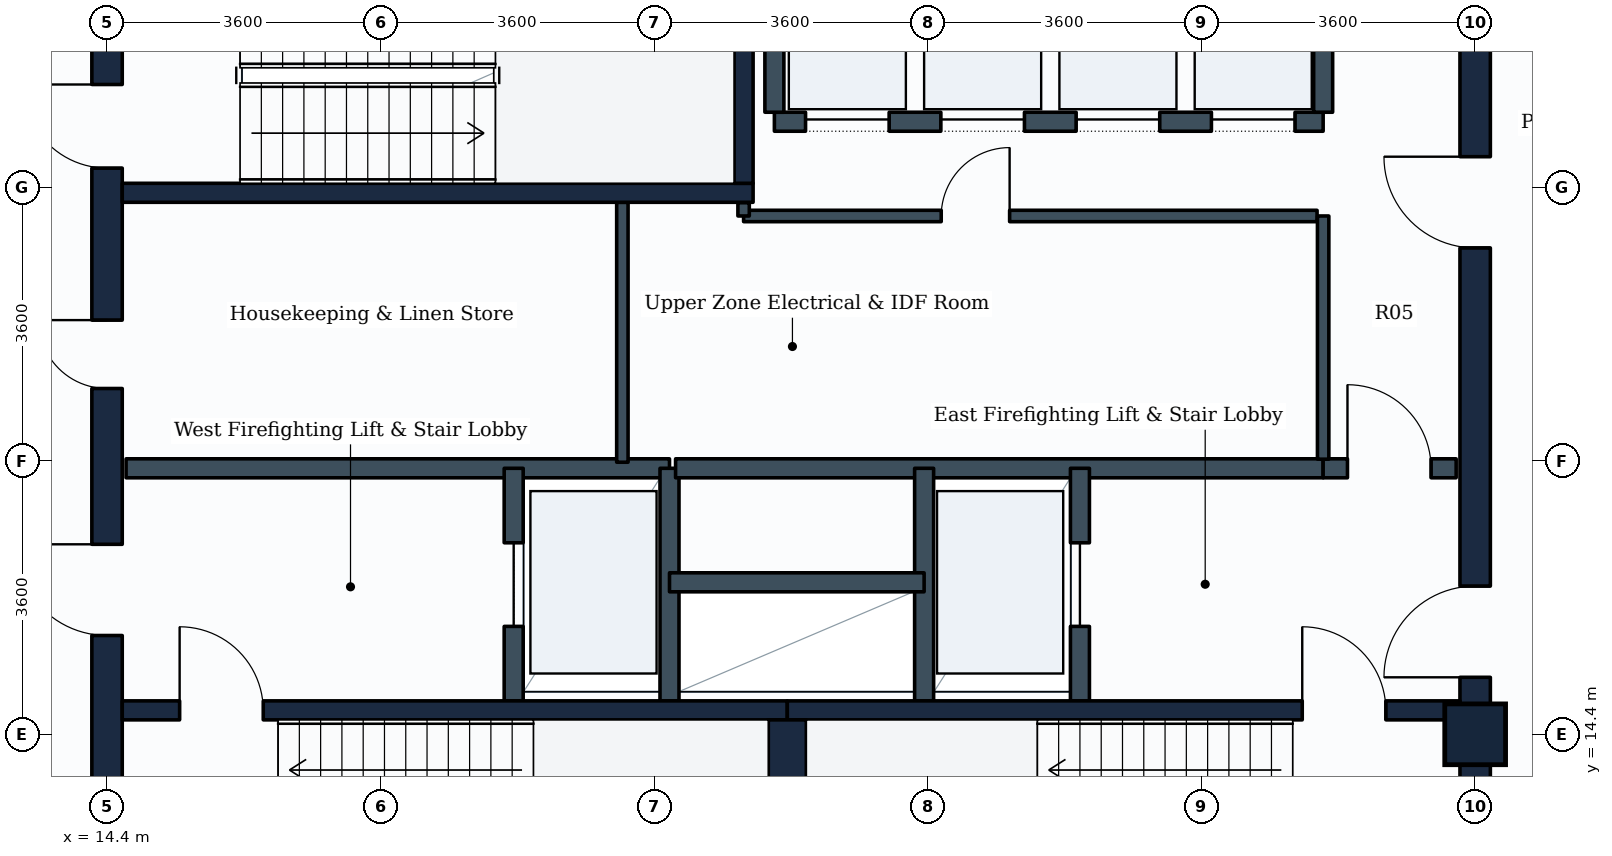
"""IFC4 building model, lengths in metres.
Left out: names, types, materials, properties, quantities, classifications, styles, units other than length and angle.
Written with IfcOpenShell. Run it as: python <this file> out.ifc"""

import sys

from ifc_helpers import new_model, si_unit, direction, frame, frame_2d, origin, origin_2d, place, context, subcontext, project, spatial, rectangle, extrude, element, fill, save


model = new_model("IFC4")
c1 = context("Model", 3, precision=1e-05, world=origin(), true_north=direction((0.0, 1.0)))
c2 = subcontext(c1, "Body", "Model", "MODEL_VIEW")
j1 = project(units=[si_unit("LENGTHUNIT", "METRE"), si_unit("PLANEANGLEUNIT", "RADIAN")], contexts=[c1])
p1 = place(None, origin())
s1 = spatial("IfcSite", under=j1, at=p1, CompositionType="ELEMENT")
p2 = place(p1, origin())
s2 = spatial("IfcBuilding", under=s1, at=p2, CompositionType="ELEMENT")
p3 = place(p2, frame((0.0, 0.0, 295.4)))
s3 = spatial("IfcBuildingStorey", under=s2, at=p3, CompositionType="ELEMENT", Elevation=295.4)
p4 = place(p3, frame((32.4, 14.4, 0.0), z_axis=(0.0, 0.0, 1.0), x_axis=(1.0, 0.0, 0.0)))
e1 = element("IfcColumn", 1, at=p4, inside=s3, PredefinedType="COLUMN", context=c2, shape_type="SweptSolid", body=[
    extrude(rectangle(XDim=0.8, YDim=0.8, at=origin_2d()), origin(), (0.0, 0.0, 1.0), 4.4),
])
p5 = place(p3, frame((14.4, 10.8, 0.0), z_axis=(0.0, 0.0, 1.0), x_axis=(0.0, 1.0, 0.0)))
e2 = element("IfcWall", 2, at=p5, inside=s3, PredefinedType="SHEAR", context=c2, shape_type="SweptSolid", body=[
    extrude(rectangle(XDim=14.4, YDim=0.4, at=frame_2d((7.2, 0.0))), origin(), (0.0, 0.0, 1.0), 4.15),
])
p6 = place(p5, frame((11.05, 0.0, 0.0)))
e3 = element("IfcOpeningElement", 3, at=p6, cuts=e2, PredefinedType="OPENING", context=c2, shape_type="SweptSolid", body=[
    extrude(rectangle(XDim=1.1, YDim=2.1, at=frame_2d((0.55, 1.05))), frame((0.0, 0.21, 0.0), z_axis=(0.0, -1.0, 0.0), x_axis=(1.0, 0.0, 0.0)), (0.0, 0.0, 1.0), 0.42),
])
p7 = place(p5, frame((4.9, 0.0, 0.0)))
e4 = element("IfcOpeningElement", 4, at=p7, cuts=e2, PredefinedType="OPENING", context=c2, shape_type="SweptSolid", body=[
    extrude(rectangle(XDim=1.2, YDim=2.1, at=frame_2d((0.6, 1.05))), frame((0.0, 0.21, 0.0), z_axis=(0.0, -1.0, 0.0), x_axis=(1.0, 0.0, 0.0)), (0.0, 0.0, 1.0), 0.42),
])
p8 = place(p5, frame((8.15, 0.0, 0.0)))
e5 = element("IfcOpeningElement", 5, at=p8, cuts=e2, PredefinedType="OPENING", context=c2, shape_type="SweptSolid", body=[
    extrude(rectangle(XDim=0.9, YDim=2.1, at=frame_2d((0.45, 1.05))), frame((0.0, 0.21, 0.0), z_axis=(0.0, -1.0, 0.0), x_axis=(1.0, 0.0, 0.0)), (0.0, 0.0, 1.0), 0.42),
])
p9 = place(p3, frame((32.4, 10.8, 0.0), z_axis=(0.0, 0.0, 1.0), x_axis=(0.0, 1.0, 0.0)))
e6 = element("IfcWall", 6, at=p9, inside=s3, PredefinedType="SHEAR", context=c2, shape_type="SweptSolid", body=[
    extrude(rectangle(XDim=14.4, YDim=0.4, at=frame_2d((7.2, 0.0))), origin(), (0.0, 0.0, 1.0), 4.15),
])
p10 = place(p9, frame((4.35, 0.0, 0.0)))
e7 = element("IfcOpeningElement", 7, at=p10, cuts=e6, PredefinedType="OPENING", context=c2, shape_type="SweptSolid", body=[
    extrude(rectangle(XDim=1.2, YDim=2.1, at=frame_2d((0.6, 1.05))), frame((0.0, 0.21, 0.0), z_axis=(0.0, -1.0, 0.0), x_axis=(1.0, 0.0, 0.0)), (0.0, 0.0, 1.0), 0.42),
])
p11 = place(p9, frame((10.0, 0.0, 0.0)))
e8 = element("IfcOpeningElement", 8, at=p11, cuts=e6, PredefinedType="OPENING", context=c2, shape_type="SweptSolid", body=[
    extrude(rectangle(XDim=1.2, YDim=2.1, at=frame_2d((0.6, 1.05))), frame((0.0, 0.21, 0.0), z_axis=(0.0, -1.0, 0.0), x_axis=(1.0, 0.0, 0.0)), (0.0, 0.0, 1.0), 0.42),
])
p12 = place(p3, frame((14.6, 14.715, 0.0), z_axis=(0.0, 0.0, 1.0), x_axis=(1.0, 0.0, 0.0)))
e9 = element("IfcWall", 9, at=p12, inside=s3, PredefinedType="SHEAR", context=c2, shape_type="SweptSolid", body=[
    extrude(rectangle(XDim=8.75, YDim=0.25, at=frame_2d((4.375, 0.0))), origin(), (0.0, 0.0, 1.0), 4.15),
])
p13 = place(p12, frame((0.755, 0.0, 0.0)))
e10 = element("IfcOpeningElement", 10, at=p13, cuts=e9, PredefinedType="OPENING", context=c2, shape_type="SweptSolid", body=[
    extrude(rectangle(XDim=1.1, YDim=2.1, at=frame_2d((0.55, 1.05))), frame((0.0, 0.135, 0.0), z_axis=(0.0, -1.0, 0.0), x_axis=(1.0, 0.0, 0.0)), (0.0, 0.0, 1.0), 0.27),
])
p14 = place(p3, frame((23.35, 14.715, 0.0), z_axis=(0.0, 0.0, 1.0), x_axis=(1.0, 0.0, 0.0)))
e11 = element("IfcWall", 11, at=p14, inside=s3, PredefinedType="SHEAR", context=c2, shape_type="SweptSolid", body=[
    extrude(rectangle(XDim=8.85, YDim=0.25, at=frame_2d((4.425, 0.0))), origin(), (0.0, 0.0, 1.0), 4.15),
])
p15 = place(p14, frame((6.775, 0.0, 0.0)))
e12 = element("IfcOpeningElement", 12, at=p15, cuts=e11, PredefinedType="OPENING", context=c2, shape_type="SweptSolid", body=[
    extrude(rectangle(XDim=1.1, YDim=2.1, at=frame_2d((0.55, 1.05))), frame((0.0, 0.135, 0.0), z_axis=(0.0, -1.0, 0.0), x_axis=(1.0, 0.0, 0.0)), (0.0, 0.0, 1.0), 0.27),
])
p16 = place(p3, frame((23.35, 11.75, 0.0), z_axis=(0.0, 0.0, 1.0), x_axis=(0.0, 1.0, 0.0)))
e13 = element("IfcWall", 13, at=p16, inside=s3, PredefinedType="SHEAR", context=c2, shape_type="SweptSolid", body=[
    extrude(rectangle(XDim=2.84, YDim=0.5, at=frame_2d((1.42, 0.0))), origin(), (0.0, 0.0, 1.0), 4.15),
])
p17 = place(p3, frame((14.6, 21.525, 0.0), z_axis=(0.0, 0.0, 1.0), x_axis=(1.0, 0.0, 0.0)))
e14 = element("IfcWall", 14, at=p17, inside=s3, PredefinedType="SHEAR", context=c2, shape_type="SweptSolid", body=[
    extrude(rectangle(XDim=8.3, YDim=0.25, at=frame_2d((4.15, 0.0))), origin(), (0.0, 0.0, 1.0), 4.15),
])
p18 = place(p3, frame((22.775, 21.65, 0.0), z_axis=(0.0, 0.0, 1.0), x_axis=(0.0, 1.0, 0.0)))
e15 = element("IfcWall", 15, at=p18, inside=s3, PredefinedType="SHEAR", context=c2, shape_type="SweptSolid", body=[
    extrude(rectangle(XDim=2.84, YDim=0.25, at=frame_2d((1.42, 0.0))), origin(), (0.0, 0.0, 1.0), 4.15),
])
p19 = place(p3, frame((14.65, 17.9, 0.0), z_axis=(0.0, 0.0, 1.0), x_axis=(1.0, 0.0, 0.0)))
e16 = element("IfcWall", 16, at=p19, inside=s3, PredefinedType="PARTITIONING", context=c2, shape_type="SweptSolid", body=[
    extrude(rectangle(XDim=7.15, YDim=0.25, at=frame_2d((3.575, 0.0))), origin(), (0.0, 0.0, 1.0), 4.135),
])
p20 = place(p3, frame((19.75, 14.84, 0.0), z_axis=(0.0, 0.0, 1.0), x_axis=(0.0, 1.0, 0.0)))
e17 = element("IfcWall", 17, at=p20, inside=s3, PredefinedType="PARTITIONING", context=c2, shape_type="SweptSolid", body=[
    extrude(rectangle(XDim=3.06, YDim=0.25, at=frame_2d((1.53, 0.0))), origin(), (0.0, 0.0, 1.0), 4.135),
])
p21 = place(p20, frame((0.98, 0.0, 0.0)))
e18 = element("IfcOpeningElement", 18, at=p21, cuts=e17, PredefinedType="OPENING", context=c2, shape_type="SweptSolid", body=[
    extrude(rectangle(XDim=1.1, YDim=2.1, at=frame_2d((0.55, 1.05))), frame((0.0, 0.135, 0.0), z_axis=(0.0, -1.0, 0.0), x_axis=(1.0, 0.0, 0.0)), (0.0, 0.0, 1.0), 0.27),
])
p22 = place(p3, frame((21.8, 14.84, 0.0), z_axis=(0.0, 0.0, 1.0), x_axis=(0.0, 1.0, 0.0)))
e19 = element("IfcWall", 19, at=p22, inside=s3, PredefinedType="PARTITIONING", context=c2, shape_type="SweptSolid", body=[
    extrude(rectangle(XDim=3.06, YDim=0.25, at=frame_2d((1.53, 0.0))), origin(), (0.0, 0.0, 1.0), 4.135),
])
p23 = place(p3, frame((21.88, 17.9, 0.0), z_axis=(0.0, 0.0, 1.0), x_axis=(1.0, 0.0, 0.0)))
e20 = element("IfcWall", 20, at=p23, inside=s3, PredefinedType="PARTITIONING", context=c2, shape_type="SweptSolid", body=[
    extrude(rectangle(XDim=8.52, YDim=0.25, at=frame_2d((4.26, 0.0))), origin(), (0.0, 0.0, 1.0), 4.135),
])
p24 = place(p3, frame((30.4, 17.9, 0.0), z_axis=(0.0, 0.0, 1.0), x_axis=(1.0, 0.0, 0.0)))
e21 = element("IfcWall", 21, at=p24, inside=s3, PredefinedType="PARTITIONING", context=c2, shape_type="SweptSolid", body=[
    extrude(rectangle(XDim=1.75, YDim=0.25, at=frame_2d((0.875, 0.0))), origin(), (0.0, 0.0, 1.0), 4.135),
])
p25 = place(p24, frame((0.32, 0.0, 0.0)))
e22 = element("IfcOpeningElement", 22, at=p25, cuts=e21, PredefinedType="OPENING", context=c2, shape_type="SweptSolid", body=[
    extrude(rectangle(XDim=1.1, YDim=2.1, at=frame_2d((0.55, 1.05))), frame((0.0, 0.135, 0.0), z_axis=(0.0, -1.0, 0.0), x_axis=(1.0, 0.0, 0.0)), (0.0, 0.0, 1.0), 0.27),
])
p26 = place(p3, frame((25.15, 14.84, 0.0), z_axis=(0.0, 0.0, 1.0), x_axis=(0.0, 1.0, 0.0)))
e23 = element("IfcWall", 23, at=p26, inside=s3, PredefinedType="PARTITIONING", context=c2, shape_type="SweptSolid", body=[
    extrude(rectangle(XDim=3.06, YDim=0.25, at=frame_2d((1.53, 0.0))), origin(), (0.0, 0.0, 1.0), 4.135),
])
p27 = place(p3, frame((27.2, 14.84, 0.0), z_axis=(0.0, 0.0, 1.0), x_axis=(0.0, 1.0, 0.0)))
e24 = element("IfcWall", 24, at=p27, inside=s3, PredefinedType="PARTITIONING", context=c2, shape_type="SweptSolid", body=[
    extrude(rectangle(XDim=3.06, YDim=0.25, at=frame_2d((1.53, 0.0))), origin(), (0.0, 0.0, 1.0), 4.135),
])
p28 = place(p27, frame((0.98, 0.0, 0.0)))
e25 = element("IfcOpeningElement", 25, at=p28, cuts=e24, PredefinedType="OPENING", context=c2, shape_type="SweptSolid", body=[
    extrude(rectangle(XDim=1.1, YDim=2.1, at=frame_2d((0.55, 1.05))), frame((0.0, 0.135, 0.0), z_axis=(0.0, -1.0, 0.0), x_axis=(1.0, 0.0, 0.0)), (0.0, 0.0, 1.0), 0.27),
])
p29 = place(p3, frame((21.8, 16.4, 0.0), z_axis=(0.0, 0.0, 1.0), x_axis=(1.0, 0.0, 0.0)))
e26 = element("IfcWall", 26, at=p29, inside=s3, PredefinedType="PARTITIONING", context=c2, shape_type="SweptSolid", body=[
    extrude(rectangle(XDim=3.35, YDim=0.25, at=frame_2d((1.675, 0.0))), origin(), (0.0, 0.0, 1.0), 4.135),
])
p30 = place(p3, frame((23.18, 22.46, 0.0), z_axis=(0.0, 0.0, 1.0), x_axis=(1.0, 0.0, 0.0)))
e27 = element("IfcWall", 27, at=p30, inside=s3, PredefinedType="PARTITIONING", context=c2, shape_type="SweptSolid", body=[
    extrude(rectangle(XDim=7.22, YDim=0.25, at=frame_2d((3.61, 0.0))), origin(), (0.0, 0.0, 1.0), 4.135),
])
p31 = place(p30, frame((0.41, 0.0, 0.0)))
e28 = element("IfcOpeningElement", 28, at=p31, cuts=e27, PredefinedType="OPENING", context=c2, shape_type="SweptSolid", body=[
    extrude(rectangle(XDim=1.1, YDim=2.1, at=frame_2d((0.55, 1.05))), frame((0.0, 0.135, 0.0), z_axis=(0.0, -1.0, 0.0), x_axis=(1.0, 0.0, 0.0)), (0.0, 0.0, 1.0), 0.27),
])
p32 = place(p30, frame((2.19, 0.0, 0.0)))
e29 = element("IfcOpeningElement", 29, at=p32, cuts=e27, PredefinedType="OPENING", context=c2, shape_type="SweptSolid", body=[
    extrude(rectangle(XDim=1.1, YDim=2.1, at=frame_2d((0.55, 1.05))), frame((0.0, 0.135, 0.0), z_axis=(0.0, -1.0, 0.0), x_axis=(1.0, 0.0, 0.0)), (0.0, 0.0, 1.0), 0.27),
])
p33 = place(p30, frame((3.97, 0.0, 0.0)))
e30 = element("IfcOpeningElement", 30, at=p33, cuts=e27, PredefinedType="OPENING", context=c2, shape_type="SweptSolid", body=[
    extrude(rectangle(XDim=1.1, YDim=2.1, at=frame_2d((0.55, 1.05))), frame((0.0, 0.135, 0.0), z_axis=(0.0, -1.0, 0.0), x_axis=(1.0, 0.0, 0.0)), (0.0, 0.0, 1.0), 0.27),
])
p34 = place(p30, frame((5.75, 0.0, 0.0)))
e31 = element("IfcOpeningElement", 31, at=p34, cuts=e27, PredefinedType="OPENING", context=c2, shape_type="SweptSolid", body=[
    extrude(rectangle(XDim=1.1, YDim=2.1, at=frame_2d((0.55, 1.05))), frame((0.0, 0.135, 0.0), z_axis=(0.0, -1.0, 0.0), x_axis=(1.0, 0.0, 0.0)), (0.0, 0.0, 1.0), 0.27),
])
for number, where, z_axis, x_axis in (
    (32, (23.18, 22.585, 0.0), (0.0, 0.0, 1.0), (0.0, 1.0, 0.0)),
    (33, (30.4, 22.585, 0.0), (0.0, 0.0, 1.0), (0.0, 1.0, 0.0)),
):
    element("IfcWall", number, at=place(p3, frame(where, z_axis=z_axis, x_axis=x_axis)), inside=s3, PredefinedType="PARTITIONING", context=c2, shape_type="SweptSolid", body=[
        extrude(rectangle(XDim=2.315, YDim=0.25, at=frame_2d((1.157, 0.0))), origin(), (0.0, 0.0, 1.0), 4.135),
    ])
p35 = place(p3, frame((22.775, 21.22, 0.0), z_axis=(0.0, 0.0, 1.0), x_axis=(1.0, 0.0, 0.0)))
e34 = element("IfcWall", 34, at=p35, inside=s3, PredefinedType="PARTITIONING", context=c2, shape_type="SweptSolid", body=[
    extrude(rectangle(XDim=7.545, YDim=0.15, at=frame_2d((3.772, 0.0))), origin(), (0.0, 0.0, 1.0), 4.135),
])
p36 = place(p35, frame((2.6, 0.0, 0.0)))
e35 = element("IfcOpeningElement", 35, at=p36, cuts=e34, PredefinedType="OPENING", context=c2, shape_type="SweptSolid", body=[
    extrude(rectangle(XDim=0.9, YDim=2.1, at=frame_2d((0.45, 1.05))), frame((0.0, 0.085, 0.0), z_axis=(0.0, -1.0, 0.0), x_axis=(1.0, 0.0, 0.0)), (0.0, 0.0, 1.0), 0.17),
])
p37 = place(p3, frame((22.775, 21.22, 0.0), z_axis=(0.0, 0.0, 1.0), x_axis=(0.0, 1.0, 0.0)))
e36 = element("IfcWall", 36, at=p37, inside=s3, PredefinedType="PARTITIONING", context=c2, shape_type="SweptSolid", body=[
    extrude(rectangle(XDim=0.175, YDim=0.15, at=frame_2d((0.087, 0.0))), origin(), (0.0, 0.0, 1.0), 4.135),
])
p38 = place(p3, frame((30.4, 18.02, 0.0), z_axis=(0.0, 0.0, 1.0), x_axis=(0.0, 1.0, 0.0)))
e37 = element("IfcWall", 37, at=p38, inside=s3, PredefinedType="PARTITIONING", context=c2, shape_type="SweptSolid", body=[
    extrude(rectangle(XDim=3.2, YDim=0.15, at=frame_2d((1.6, 0.0))), origin(), (0.0, 0.0, 1.0), 4.135),
])
p39 = place(p3, frame((21.18, 17.98, 0.0), z_axis=(0.0, 0.0, 1.0), x_axis=(0.0, 1.0, 0.0)))
e38 = element("IfcWall", 38, at=p39, inside=s3, PredefinedType="PARTITIONING", context=c2, shape_type="SweptSolid", body=[
    extrude(rectangle(XDim=3.42, YDim=0.15, at=frame_2d((1.71, 0.0))), origin(), (0.0, 0.0, 1.0), 4.135),
])
p40 = place(p13, origin())
e39 = element("IfcDoor", 39, at=p40, inside=s3, OperationType="SINGLE_SWING_LEFT", PredefinedType="DOOR", context=c2, shape_type="SweptSolid", body=[
    extrude(rectangle(XDim=1.1, YDim=2.1, at=frame_2d((0.55, 1.05))), frame((0.0, 0.025, 0.0), z_axis=(0.0, -1.0, 0.0), x_axis=(1.0, 0.0, 0.0)), (0.0, 0.0, 1.0), 0.05),
])
fill(e10, e39)
p41 = place(p15, origin())
e40 = element("IfcDoor", 40, at=p41, inside=s3, OperationType="SINGLE_SWING_LEFT", PredefinedType="DOOR", context=c2, shape_type="SweptSolid", body=[
    extrude(rectangle(XDim=1.1, YDim=2.1, at=frame_2d((0.55, 1.05))), frame((0.0, 0.025, 0.0), z_axis=(0.0, -1.0, 0.0), x_axis=(1.0, 0.0, 0.0)), (0.0, 0.0, 1.0), 0.05),
])
fill(e12, e40)
p42 = place(p6, origin())
e41 = element("IfcDoor", 41, at=p42, inside=s3, OperationType="SINGLE_SWING_RIGHT", PredefinedType="DOOR", context=c2, shape_type="SweptSolid", body=[
    extrude(rectangle(XDim=1.1, YDim=2.1, at=frame_2d((0.55, 1.05))), frame((0.0, 0.025, 0.0), z_axis=(0.0, -1.0, 0.0), x_axis=(1.0, 0.0, 0.0)), (0.0, 0.0, 1.0), 0.05),
])
fill(e3, e41)
p43 = place(p21, origin())
e42 = element("IfcDoor", 42, at=p43, inside=s3, OperationType="SLIDING_TO_LEFT", PredefinedType="DOOR", context=c2, shape_type="SweptSolid", body=[
    extrude(rectangle(XDim=1.1, YDim=2.1, at=frame_2d((0.55, 1.05))), frame((0.0, 0.025, 0.0), z_axis=(0.0, -1.0, 0.0), x_axis=(1.0, 0.0, 0.0)), (0.0, 0.0, 1.0), 0.05),
])
fill(e18, e42)
p44 = place(p28, origin())
e43 = element("IfcDoor", 43, at=p44, inside=s3, OperationType="SLIDING_TO_LEFT", PredefinedType="DOOR", context=c2, shape_type="SweptSolid", body=[
    extrude(rectangle(XDim=1.1, YDim=2.1, at=frame_2d((0.55, 1.05))), frame((0.0, 0.025, 0.0), z_axis=(0.0, -1.0, 0.0), x_axis=(1.0, 0.0, 0.0)), (0.0, 0.0, 1.0), 0.05),
])
fill(e25, e43)
p45 = place(p7, origin())
e44 = element("IfcDoor", 44, at=p45, inside=s3, OperationType="SINGLE_SWING_RIGHT", PredefinedType="DOOR", context=c2, shape_type="SweptSolid", body=[
    extrude(rectangle(XDim=1.2, YDim=2.1, at=frame_2d((0.6, 1.05))), frame((0.0, 0.025, 0.0), z_axis=(0.0, -1.0, 0.0), x_axis=(1.0, 0.0, 0.0)), (0.0, 0.0, 1.0), 0.05),
])
fill(e4, e44)
p46 = place(p10, origin())
e45 = element("IfcDoor", 45, at=p46, inside=s3, OperationType="SINGLE_SWING_LEFT", PredefinedType="DOOR", context=c2, shape_type="SweptSolid", body=[
    extrude(rectangle(XDim=1.2, YDim=2.1, at=frame_2d((0.6, 1.05))), frame((0.0, 0.025, 0.0), z_axis=(0.0, -1.0, 0.0), x_axis=(1.0, 0.0, 0.0)), (0.0, 0.0, 1.0), 0.05),
])
fill(e7, e45)
p47 = place(p25, origin())
e46 = element("IfcDoor", 46, at=p47, inside=s3, OperationType="SINGLE_SWING_LEFT", PredefinedType="DOOR", context=c2, shape_type="SweptSolid", body=[
    extrude(rectangle(XDim=1.1, YDim=2.1, at=frame_2d((0.55, 1.05))), frame((0.0, 0.025, 0.0), z_axis=(0.0, -1.0, 0.0), x_axis=(1.0, 0.0, 0.0)), (0.0, 0.0, 1.0), 0.05),
])
fill(e22, e46)
p48 = place(p31, origin())
e47 = element("IfcDoor", 47, at=p48, inside=s3, OperationType="SLIDING_TO_LEFT", PredefinedType="DOOR", context=c2, shape_type="SweptSolid", body=[
    extrude(rectangle(XDim=1.1, YDim=2.1, at=frame_2d((0.55, 1.05))), frame((0.0, 0.025, 0.0), z_axis=(0.0, -1.0, 0.0), x_axis=(1.0, 0.0, 0.0)), (0.0, 0.0, 1.0), 0.05),
])
fill(e28, e47)
p49 = place(p32, origin())
e48 = element("IfcDoor", 48, at=p49, inside=s3, OperationType="SLIDING_TO_LEFT", PredefinedType="DOOR", context=c2, shape_type="SweptSolid", body=[
    extrude(rectangle(XDim=1.1, YDim=2.1, at=frame_2d((0.55, 1.05))), frame((0.0, 0.025, 0.0), z_axis=(0.0, -1.0, 0.0), x_axis=(1.0, 0.0, 0.0)), (0.0, 0.0, 1.0), 0.05),
])
fill(e29, e48)
p50 = place(p33, origin())
e49 = element("IfcDoor", 49, at=p50, inside=s3, OperationType="SLIDING_TO_LEFT", PredefinedType="DOOR", context=c2, shape_type="SweptSolid", body=[
    extrude(rectangle(XDim=1.1, YDim=2.1, at=frame_2d((0.55, 1.05))), frame((0.0, 0.025, 0.0), z_axis=(0.0, -1.0, 0.0), x_axis=(1.0, 0.0, 0.0)), (0.0, 0.0, 1.0), 0.05),
])
fill(e30, e49)
p51 = place(p34, origin())
e50 = element("IfcDoor", 50, at=p51, inside=s3, OperationType="SLIDING_TO_LEFT", PredefinedType="DOOR", context=c2, shape_type="SweptSolid", body=[
    extrude(rectangle(XDim=1.1, YDim=2.1, at=frame_2d((0.55, 1.05))), frame((0.0, 0.025, 0.0), z_axis=(0.0, -1.0, 0.0), x_axis=(1.0, 0.0, 0.0)), (0.0, 0.0, 1.0), 0.05),
])
fill(e31, e50)
p52 = place(p11, origin())
e51 = element("IfcDoor", 51, at=p52, inside=s3, OperationType="SINGLE_SWING_RIGHT", PredefinedType="DOOR", context=c2, shape_type="SweptSolid", body=[
    extrude(rectangle(XDim=1.2, YDim=2.1, at=frame_2d((0.6, 1.05))), frame((0.0, 0.025, 0.0), z_axis=(0.0, -1.0, 0.0), x_axis=(1.0, 0.0, 0.0)), (0.0, 0.0, 1.0), 0.05),
])
fill(e8, e51)
p53 = place(p8, origin())
e52 = element("IfcDoor", 52, at=p53, inside=s3, OperationType="SINGLE_SWING_RIGHT", PredefinedType="DOOR", context=c2, shape_type="SweptSolid", body=[
    extrude(rectangle(XDim=0.9, YDim=2.1, at=frame_2d((0.45, 1.05))), frame((0.0, 0.025, 0.0), z_axis=(0.0, -1.0, 0.0), x_axis=(1.0, 0.0, 0.0)), (0.0, 0.0, 1.0), 0.05),
])
fill(e5, e52)
p54 = place(p36, origin())
e53 = element("IfcDoor", 53, at=p54, inside=s3, OperationType="SINGLE_SWING_RIGHT", PredefinedType="DOOR", context=c2, shape_type="SweptSolid", body=[
    extrude(rectangle(XDim=0.9, YDim=2.1, at=frame_2d((0.45, 1.05))), frame((0.0, 0.025, 0.0), z_axis=(0.0, -1.0, 0.0), x_axis=(1.0, 0.0, 0.0)), (0.0, 0.0, 1.0), 0.05),
])
fill(e35, e53)
save(model, sys.argv[1])
